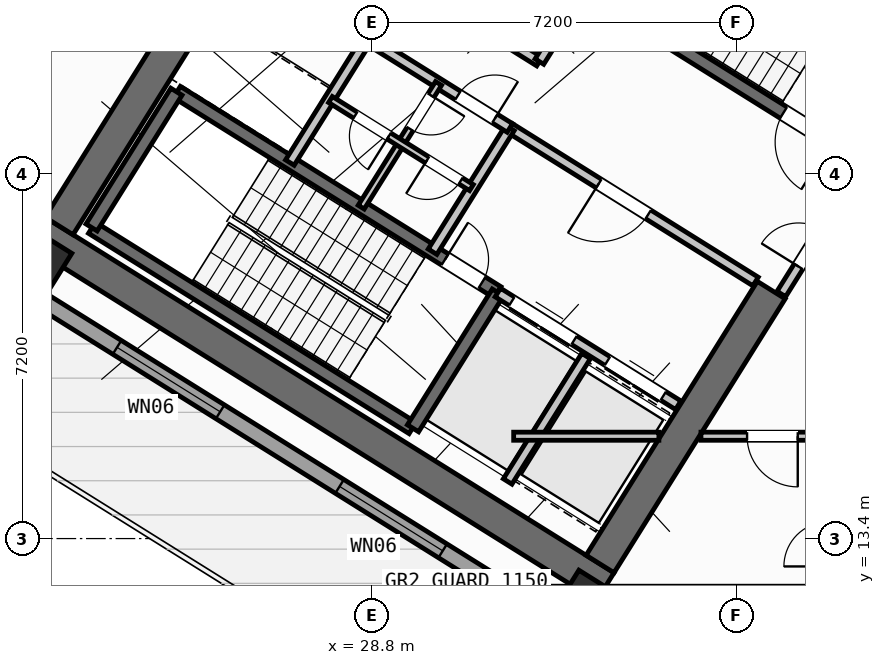
"""IFC4 building model, lengths in metres.
Left out: names, types, materials, properties, quantities, classifications, styles, units other than length and angle.
Written with IfcOpenShell. Run it as: python <this file> out.ifc"""

import sys

from ifc_helpers import new_model, si_unit, direction, frame, frame_2d, origin, origin_2d, place, context, subcontext, project, spatial, rectangle, hollow_rectangle, extrude, source, transform, mapped, element, fill, save


model = new_model("IFC4")
c1 = context("Model", 3, precision=1e-05, world=origin(), true_north=direction((0.0, 1.0)))
c2 = subcontext(c1, "Body", "Model", "MODEL_VIEW")
j1 = project(units=[si_unit("LENGTHUNIT", "METRE"), si_unit("PLANEANGLEUNIT", "RADIAN")], contexts=[c1])
p1 = place(None, origin())
s1 = spatial("IfcSite", under=j1, at=p1, CompositionType="ELEMENT")
p2 = place(p1, origin())
s2 = spatial("IfcBuilding", under=s1, at=p2, CompositionType="ELEMENT")
p3 = place(p2, frame((0.0, 0.0, 71.7)))
s3 = spatial("IfcBuildingStorey", under=s2, at=p3, CompositionType="ELEMENT", Elevation=71.7)
p4 = place(p3, frame((33.409, 12.45, 0.0), z_axis=(0.0, 0.0, 1.0), x_axis=(-0.848051132073, 0.529914405721, 0.0)))
e1 = element("IfcWall", 1, at=p4, inside=s3, PredefinedType="SHEAR", context=c2, shape_type="SweptSolid", body=[
    extrude(rectangle(XDim=13.24, YDim=0.65, at=frame_2d((6.62, 0.0))), origin(), (0.0, 0.0, 1.0), 4.52),
])
p5 = place(p3, frame((36.683, 18.304, 0.0), z_axis=(0.0, 0.0, 1.0), x_axis=(-0.529899109053, -0.848060690178, 0.0)))
e2 = element("IfcWall", 2, at=p5, inside=s3, PredefinedType="SHEAR", context=c2, shape_type="SweptSolid", body=[
    extrude(rectangle(XDim=6.375, YDim=0.65, at=frame_2d((3.188, 0.0))), origin(), (0.0, 0.0, 1.0), 4.52),
])
p6 = place(p3, frame((26.007, 24.976, 0.0), z_axis=(0.0, 0.0, 1.0), x_axis=(-0.529916319127, -0.848049936456, 0.0)))
e3 = element("IfcWall", 3, at=p6, inside=s3, PredefinedType="SHEAR", context=c2, shape_type="SweptSolid", body=[
    extrude(rectangle(XDim=6.375, YDim=0.65, at=frame_2d((3.188, 0.0))), origin(), (0.0, 0.0, 1.0), 4.52),
])
m1 = source(origin(), c2, "Body", "SweptSolid", [
    extrude(hollow_rectangle(XDim=1.0, YDim=1.0, WallThickness=0.04, at=origin_2d()), origin(), (0.0, 0.0, 1.0), 4.8),
])
for number, where, z_axis, x_axis in (
    (4, (33.046, 12.087, 0.0), (0.0, 0.0, 1.0), (-0.848, 0.53, 0.0)),
    (5, (22.191, 18.87, 0.0), (0.0, 0.0, 1.0), (-0.848, 0.53, 0.0)),
):
    element("IfcColumn", number, at=place(p3, frame(where, z_axis=z_axis, x_axis=x_axis)), inside=s3, PredefinedType="COLUMN", context=c2, shape_type="MappedRepresentation", body=[
        mapped(m1, transform((0.0, 0.0, 0.0), scale=1.0)),
    ])
p7 = place(p3, frame((31.76, 12.183, 0.0), z_axis=(0.0, 0.0, 1.0), x_axis=(-0.848047074256, 0.529920899612, 0.0)))
e6 = element("IfcWall", 6, at=p7, inside=s3, PredefinedType="STANDARD", context=c2, shape_type="SweptSolid", body=[
    extrude(rectangle(XDim=30.652, YDim=0.32, at=frame_2d((15.326, 0.0))), origin(), (0.0, 0.0, 1.0), 4.52),
])
p8 = place(p7, frame((20.241, 0.0, 0.0)))
e7 = element("IfcOpeningElement", 7, at=p8, cuts=e6, PredefinedType="OPENING", context=c2, shape_type="SweptSolid", body=[
    extrude(rectangle(XDim=1.2, YDim=2.15, at=frame_2d((0.6, 1.075))), frame((0.0, 0.17, 0.0), z_axis=(0.0, -1.0, 0.0), x_axis=(1.0, 0.0, 0.0)), (0.0, 0.0, 1.0), 0.34),
])
p9 = place(p7, frame((14.781, 0.0, 0.0)))
e8 = element("IfcOpeningElement", 8, at=p9, cuts=e6, PredefinedType="OPENING", context=c2, shape_type="SweptSolid", body=[
    extrude(rectangle(XDim=1.5, YDim=2.25, at=frame_2d((0.75, 1.125))), frame((0.0, 0.17, 0.0), z_axis=(0.0, -1.0, 0.0), x_axis=(1.0, 0.0, 0.0)), (0.0, 0.0, 1.0), 0.34),
])
p10 = place(p7, frame((1.84, 0.0, 0.75)))
e9 = element("IfcOpeningElement", 9, at=p10, cuts=e6, PredefinedType="OPENING", context=c2, shape_type="SweptSolid", body=[
    extrude(rectangle(XDim=2.4, YDim=1.6, at=frame_2d((1.2, 0.8))), frame((0.0, 0.17, 0.0), z_axis=(0.0, -1.0, 0.0), x_axis=(1.0, 0.0, 0.0)), (0.0, 0.0, 1.0), 0.34),
])
p11 = place(p7, frame((7.019, 0.0, 0.75)))
e10 = element("IfcOpeningElement", 10, at=p11, cuts=e6, PredefinedType="OPENING", context=c2, shape_type="SweptSolid", body=[
    extrude(rectangle(XDim=2.4, YDim=1.6, at=frame_2d((1.2, 0.8))), frame((0.0, 0.17, 0.0), z_axis=(0.0, -1.0, 0.0), x_axis=(1.0, 0.0, 0.0)), (0.0, 0.0, 1.0), 0.34),
])
p12 = place(p7, frame((25.841, 0.0, 0.95)))
e11 = element("IfcOpeningElement", 11, at=p12, cuts=e6, PredefinedType="OPENING", context=c2, shape_type="SweptSolid", body=[
    extrude(rectangle(XDim=1.2, YDim=1.4, at=frame_2d((0.6, 0.7))), frame((0.0, 0.17, 0.0), z_axis=(0.0, -1.0, 0.0), x_axis=(1.0, 0.0, 0.0)), (0.0, 0.0, 1.0), 0.34),
])
p13 = place(p3, frame((29.605, 15.581, 0.0), z_axis=(0.0, 0.0, 1.0), x_axis=(-0.848036911448, 0.529937163087, 0.0)))
e12 = element("IfcWall", 12, at=p13, inside=s3, PredefinedType="SHEAR", context=c2, shape_type="SweptSolid", body=[
    extrude(rectangle(XDim=7.46, YDim=0.26, at=frame_2d((3.73, 0.0))), origin(), (0.0, 0.0, 1.0), 4.52),
])
p14 = place(p3, frame((31.28, 18.261, 0.0), z_axis=(0.0, 0.0, 1.0), x_axis=(-0.848051618787, 0.529913626805, 0.0)))
e13 = element("IfcWall", 13, at=p14, inside=s3, PredefinedType="SHEAR", context=c2, shape_type="SweptSolid", body=[
    extrude(rectangle(XDim=7.46, YDim=0.26, at=frame_2d((3.73, 0.0))), origin(), (0.0, 0.0, 1.0), 4.52),
])
p15 = place(p14, frame((0.36, 0.0, 0.0)))
e14 = element("IfcOpeningElement", 14, at=p15, cuts=e13, PredefinedType="OPENING", context=c2, shape_type="SweptSolid", body=[
    extrude(rectangle(XDim=0.86, YDim=2.05, at=frame_2d((0.43, 1.025))), frame((0.0, 0.14, 0.0), z_axis=(0.0, -1.0, 0.0), x_axis=(1.0, 0.0, 0.0)), (0.0, 0.0, 1.0), 0.28),
])
p16 = place(p3, frame((31.288, 18.256, 0.0), z_axis=(0.0, 0.0, 1.0), x_axis=(-0.529943379326, -0.848033026897, 0.0)))
e15 = element("IfcWall", 15, at=p16, inside=s3, PredefinedType="SHEAR", context=c2, shape_type="SweptSolid", body=[
    extrude(rectangle(XDim=3.16, YDim=0.26, at=frame_2d((1.58, 0.0))), origin(), (0.0, 0.0, 1.0), 4.52),
])
p17 = place(p3, frame((24.945, 22.22, 0.0), z_axis=(0.0, 0.0, 1.0), x_axis=(-0.529908658664, -0.84805472316, 0.0)))
e16 = element("IfcWall", 16, at=p17, inside=s3, PredefinedType="SHEAR", context=c2, shape_type="SweptSolid", body=[
    extrude(rectangle(XDim=3.16, YDim=0.26, at=frame_2d((1.58, 0.0))), origin(), (0.0, 0.0, 1.0), 4.52),
])
p18 = place(p3, frame((38.046, 21.108, 0.0), z_axis=(0.0, 0.0, 1.0), x_axis=(-0.848054434086, 0.529909121291, 0.0)))
e17 = element("IfcWall", 17, at=p18, inside=s3, PredefinedType="SHEAR", context=c2, shape_type="SweptSolid", body=[
    extrude(rectangle(XDim=7.33, YDim=0.26, at=frame_2d((3.665, 0.0))), origin(), (0.0, 0.0, 1.0), 4.52),
])
p19 = place(p18, frame((0.22, 0.0, 0.0)))
e18 = element("IfcOpeningElement", 18, at=p19, cuts=e17, PredefinedType="OPENING", context=c2, shape_type="SweptSolid", body=[
    extrude(rectangle(XDim=1.1, YDim=2.1, at=frame_2d((0.55, 1.05))), frame((0.0, 0.14, 0.0), z_axis=(0.0, -1.0, 0.0), x_axis=(1.0, 0.0, 0.0)), (0.0, 0.0, 1.0), 0.28),
])
p20 = place(p3, frame((34.848, 16.031, 0.0), z_axis=(0.0, 0.0, 1.0), x_axis=(-0.848044042236, 0.529925751807, 0.0)))
e19 = element("IfcWall", 19, at=p20, inside=s3, PredefinedType="STANDARD", context=c2, shape_type="SweptSolid", body=[
    extrude(rectangle(XDim=4.198, YDim=0.2, at=frame_2d((2.099, 0.0))), origin(), (0.0, 0.0, 1.0), 4.51),
])
p21 = place(p20, frame((0.348, 0.0, 0.0)))
e20 = element("IfcOpeningElement", 20, at=p21, cuts=e19, PredefinedType="OPENING", context=c2, shape_type="SweptSolid", body=[
    extrude(rectangle(XDim=1.3, YDim=2.2, at=frame_2d((0.65, 1.1))), frame((0.0, 0.11, 0.0), z_axis=(0.0, -1.0, 0.0), x_axis=(1.0, 0.0, 0.0)), (0.0, 0.0, 1.0), 0.22),
])
p22 = place(p20, frame((2.423, 0.0, 0.0)))
e21 = element("IfcOpeningElement", 21, at=p22, cuts=e19, PredefinedType="OPENING", context=c2, shape_type="SweptSolid", body=[
    extrude(rectangle(XDim=1.45, YDim=2.25, at=frame_2d((0.725, 1.125))), frame((0.0, 0.11, 0.0), z_axis=(0.0, -1.0, 0.0), x_axis=(1.0, 0.0, 0.0)), (0.0, 0.0, 1.0), 0.22),
])
p23 = place(p3, frame((36.374, 18.474, 0.0), z_axis=(0.0, 0.0, 1.0), x_axis=(-0.848051071577, 0.529914502535, 0.0)))
e22 = element("IfcWall", 22, at=p23, inside=s3, PredefinedType="STANDARD", context=c2, shape_type="SweptSolid", body=[
    extrude(rectangle(XDim=5.718, YDim=0.2, at=frame_2d((2.859, 0.0))), origin(), (0.0, 0.0, 1.0), 4.51),
])
p24 = place(p23, frame((2.498, 0.0, 0.0)))
e23 = element("IfcOpeningElement", 23, at=p24, cuts=e22, PredefinedType="OPENING", context=c2, shape_type="SweptSolid", body=[
    extrude(rectangle(XDim=1.15, YDim=2.1, at=frame_2d((0.575, 1.05))), frame((0.0, 0.11, 0.0), z_axis=(0.0, -1.0, 0.0), x_axis=(1.0, 0.0, 0.0)), (0.0, 0.0, 1.0), 0.22),
])
p25 = place(p3, frame((32.108, 22.814, 0.0), z_axis=(0.0, 0.0, 1.0), x_axis=(-0.848042229521, 0.529928652696, 0.0)))
e24 = element("IfcWall", 24, at=p25, inside=s3, PredefinedType="STANDARD", context=c2, shape_type="SweptSolid", body=[
    extrude(rectangle(XDim=5.62, YDim=0.2, at=frame_2d((2.81, 0.0))), origin(), (0.0, 0.0, 1.0), 4.51),
])
p26 = place(p3, frame((32.982, 24.213, 0.0), z_axis=(0.0, 0.0, 1.0), x_axis=(-0.529839334948, -0.84809803628, 0.0)))
e25 = element("IfcWall", 25, at=p26, inside=s3, PredefinedType="STANDARD", context=c2, shape_type="SweptSolid", body=[
    extrude(rectangle(XDim=1.65, YDim=0.2, at=frame_2d((0.825, 0.0))), origin(), (0.0, 0.0, 1.0), 4.51),
])
p27 = place(p3, frame((33.029, 17.003, 0.0), z_axis=(0.0, 0.0, 1.0), x_axis=(-0.529916267533, -0.848049968695, 0.0)))
e26 = element("IfcWall", 26, at=p27, inside=s3, PredefinedType="STANDARD", context=c2, shape_type="SweptSolid", body=[
    extrude(rectangle(XDim=2.92, YDim=0.2, at=frame_2d((1.46, 0.0))), origin(), (0.0, 0.0, 1.0), 4.51),
])
for number, where, z_axis, x_axis in (
    (27, (31.525, 21.504, 0.0), (0.0, 0.0, 1.0), (-0.53, -0.848, 0.0)),
    (28, (28.71, 23.263, 0.0), (0.0, 0.0, 1.0), (-0.53, -0.848, 0.0)),
):
    element("IfcWall", number, at=place(p3, frame(where, z_axis=z_axis, x_axis=x_axis)), inside=s3, PredefinedType="STANDARD", context=c2, shape_type="SweptSolid", body=[
        extrude(rectangle(XDim=2.88, YDim=0.2, at=frame_2d((1.44, 0.0))), origin(), (0.0, 0.0, 1.0), 4.51),
    ])
p28 = place(p3, frame((31.525, 21.504, 0.0), z_axis=(0.0, 0.0, 1.0), x_axis=(-0.848044998614, 0.529924221305, 0.0)))
e29 = element("IfcWall", 29, at=p28, inside=s3, PredefinedType="STANDARD", context=c2, shape_type="SweptSolid", body=[
    extrude(rectangle(XDim=6.168, YDim=0.2, at=frame_2d((3.084, 0.0))), origin(), (0.0, 0.0, 1.0), 4.51),
])
p29 = place(p28, frame((4.4, 0.0, 0.0)))
e30 = element("IfcOpeningElement", 30, at=p29, cuts=e29, PredefinedType="OPENING", context=c2, shape_type="SweptSolid", body=[
    extrude(rectangle(XDim=0.86, YDim=2.05, at=frame_2d((0.43, 1.025))), frame((0.0, 0.11, 0.0), z_axis=(0.0, -1.0, 0.0), x_axis=(1.0, 0.0, 0.0)), (0.0, 0.0, 1.0), 0.22),
])
p30 = place(p28, frame((0.35, 0.0, 0.0)))
e31 = element("IfcOpeningElement", 31, at=p30, cuts=e29, PredefinedType="OPENING", context=c2, shape_type="SweptSolid", body=[
    extrude(rectangle(XDim=0.86, YDim=2.05, at=frame_2d((0.43, 1.025))), frame((0.0, 0.11, 0.0), z_axis=(0.0, -1.0, 0.0), x_axis=(1.0, 0.0, 0.0)), (0.0, 0.0, 1.0), 0.22),
])
p31 = place(p3, frame((30.117, 22.384, 0.0), z_axis=(0.0, 0.0, 1.0), x_axis=(-0.529951914384, -0.848027693204, 0.0)))
e32 = element("IfcWall", 32, at=p31, inside=s3, PredefinedType="PLUMBINGWALL", context=c2, shape_type="SweptSolid", body=[
    extrude(rectangle(XDim=1.4, YDim=0.14, at=frame_2d((0.7, 0.0))), origin(), (0.0, 0.0, 1.0), 4.51),
])
p32 = place(p31, frame((0.28, 0.0, 0.0)))
e33 = element("IfcOpeningElement", 33, at=p32, cuts=e32, PredefinedType="OPENING", context=c2, shape_type="SweptSolid", body=[
    extrude(rectangle(XDim=0.78, YDim=2.05, at=frame_2d((0.39, 1.025))), frame((0.0, 0.08, 0.0), z_axis=(0.0, -1.0, 0.0), x_axis=(1.0, 0.0, 0.0)), (0.0, 0.0, 1.0), 0.16),
])
p33 = place(p3, frame((29.375, 21.196, 0.0), z_axis=(0.0, 0.0, 1.0), x_axis=(-0.529865479138, -0.848081702443, 0.0)))
e34 = element("IfcWall", 34, at=p33, inside=s3, PredefinedType="PLUMBINGWALL", context=c2, shape_type="SweptSolid", body=[
    extrude(rectangle(XDim=1.48, YDim=0.14, at=frame_2d((0.74, 0.0))), origin(), (0.0, 0.0, 1.0), 4.51),
])
p34 = place(p3, frame((30.766, 20.327, 0.0), z_axis=(0.0, 0.0, 1.0), x_axis=(-0.848052663127, 0.529911955482, 0.0)))
e35 = element("IfcWall", 35, at=p34, inside=s3, PredefinedType="PLUMBINGWALL", context=c2, shape_type="SweptSolid", body=[
    extrude(rectangle(XDim=3.28, YDim=0.14, at=frame_2d((1.64, 0.0))), origin(), (0.0, 0.0, 1.0), 4.51),
])
p35 = place(p34, frame((0.25, 0.0, 0.0)))
e36 = element("IfcOpeningElement", 36, at=p35, cuts=e35, PredefinedType="OPENING", context=c2, shape_type="SweptSolid", body=[
    extrude(rectangle(XDim=0.78, YDim=2.05, at=frame_2d((0.39, 1.025))), frame((0.0, 0.08, 0.0), z_axis=(0.0, -1.0, 0.0), x_axis=(1.0, 0.0, 0.0)), (0.0, 0.0, 1.0), 0.16),
])
p36 = place(p34, frame((1.92, 0.0, 0.0)))
e37 = element("IfcOpeningElement", 37, at=p36, cuts=e35, PredefinedType="OPENING", context=c2, shape_type="SweptSolid", body=[
    extrude(rectangle(XDim=0.78, YDim=2.05, at=frame_2d((0.39, 1.025))), frame((0.0, 0.08, 0.0), z_axis=(0.0, -1.0, 0.0), x_axis=(1.0, 0.0, 0.0)), (0.0, 0.0, 1.0), 0.16),
])
p37 = place(p3, frame((25.198, 28.606, 0.0), z_axis=(0.0, 0.0, 1.0), x_axis=(-0.529926497642, -0.848043576178, 0.0)))
e38 = element("IfcWall", 38, at=p37, inside=s3, PredefinedType="PARTITIONING", context=c2, shape_type="SweptSolid", body=[
    extrude(rectangle(XDim=10.3, YDim=0.16, at=frame_2d((5.15, 0.0))), origin(), (0.0, 0.0, 1.0), 4.51),
])
p38 = place(p3, frame((38.451, 20.737, 0.0), z_axis=(0.0, 0.0, 1.0), x_axis=(-0.529924799939, -0.848044637038, 0.0)))
e39 = element("IfcWall", 39, at=p38, inside=s3, PredefinedType="STANDARD", context=c2, shape_type="SweptSolid", body=[
    extrude(rectangle(XDim=2.96, YDim=0.2, at=frame_2d((1.48, 0.0))), origin(), (0.0, 0.0, 1.0), 4.51),
])
p39 = place(p38, frame((1.46, 0.0, 0.0)))
e40 = element("IfcOpeningElement", 40, at=p39, cuts=e39, PredefinedType="OPENING", context=c2, shape_type="SweptSolid", body=[
    extrude(rectangle(XDim=0.86, YDim=2.05, at=frame_2d((0.43, 1.025))), frame((0.0, 0.11, 0.0), z_axis=(0.0, -1.0, 0.0), x_axis=(1.0, 0.0, 0.0)), (0.0, 0.0, 1.0), 0.22),
])
p40 = place(p3, frame((31.6, 15.42, 0.0), z_axis=(0.0, 0.0, 1.0), x_axis=(1.0, 0.0, 0.0)))
e41 = element("IfcWall", 41, at=p40, inside=s3, PredefinedType="PARTITIONING", context=c2, shape_type="SweptSolid", body=[
    extrude(rectangle(XDim=2.866, YDim=0.16, at=frame_2d((1.433, 0.0))), origin(), (0.0, 0.0, 1.0), 4.51),
])
p41 = place(p3, frame((35.296, 15.42, 0.0), z_axis=(0.0, 0.0, 1.0), x_axis=(1.0, 0.0, 0.0)))
e42 = element("IfcWall", 42, at=p41, inside=s3, PredefinedType="PARTITIONING", context=c2, shape_type="SweptSolid", body=[
    extrude(rectangle(XDim=15.311, YDim=0.16, at=frame_2d((7.655, 0.0))), origin(), (0.0, 0.0, 1.0), 4.51),
])
p42 = place(p41, frame((0.91, 0.0, 0.0)))
e43 = element("IfcOpeningElement", 43, at=p42, cuts=e42, PredefinedType="OPENING", context=c2, shape_type="SweptSolid", body=[
    extrude(rectangle(XDim=1.0, YDim=2.1, at=frame_2d((0.5, 1.05))), frame((0.0, 0.09, 0.0), z_axis=(0.0, -1.0, 0.0), x_axis=(1.0, 0.0, 0.0)), (0.0, 0.0, 1.0), 0.18),
])
p43 = place(p41, frame((8.74, 0.0, 0.0)))
e44 = element("IfcOpeningElement", 44, at=p43, cuts=e42, PredefinedType="OPENING", context=c2, shape_type="SweptSolid", body=[
    extrude(rectangle(XDim=1.0, YDim=2.1, at=frame_2d((0.5, 1.05))), frame((0.0, 0.09, 0.0), z_axis=(0.0, -1.0, 0.0), x_axis=(1.0, 0.0, 0.0)), (0.0, 0.0, 1.0), 0.18),
])
m2 = source(origin(), c2, "Body", "SweptSolid", [
    extrude(rectangle(XDim=2.4, YDim=1.6, at=frame_2d((1.2, 0.8))), frame((0.0, 0.03, 0.0), z_axis=(0.0, -1.0, 0.0), x_axis=(1.0, 0.0, 0.0)), (0.0, 0.0, 1.0), 0.06),
])
p44 = place(p10, origin())
e45 = element("IfcWindow", 45, at=p44, inside=s3, PartitioningType="SINGLE_PANEL", PredefinedType="WINDOW", context=c2, shape_type="MappedRepresentation", body=[
    mapped(m2, transform((0.0, 0.0, 0.0), scale=1.0)),
])
fill(e9, e45)
p45 = place(p11, origin())
e46 = element("IfcWindow", 46, at=p45, inside=s3, PartitioningType="SINGLE_PANEL", PredefinedType="WINDOW", context=c2, shape_type="MappedRepresentation", body=[
    mapped(m2, transform((0.0, 0.0, 0.0), scale=1.0)),
])
fill(e10, e46)
m3 = source(origin(), c2, "Body", "SweptSolid", [
    extrude(rectangle(XDim=0.86, YDim=2.05, at=frame_2d((0.43, 1.025))), frame((0.0, 0.025, 0.0), z_axis=(0.0, -1.0, 0.0), x_axis=(1.0, 0.0, 0.0)), (0.0, 0.0, 1.0), 0.05),
])
p46 = place(p15, frame((0.86, 0.0, 0.0), z_axis=(0.0, 0.0, 1.0), x_axis=(-1.0, 0.0, 0.0)))
e47 = element("IfcDoor", 47, at=p46, inside=s3, OperationType="SINGLE_SWING_LEFT", PredefinedType="DOOR", context=c2, shape_type="MappedRepresentation", body=[
    mapped(m3, transform((0.0, 0.0, 0.0), scale=1.0)),
])
fill(e14, e47)
m4 = source(origin(), c2, "Body", "SweptSolid", [
    extrude(rectangle(XDim=1.1, YDim=2.1, at=frame_2d((0.55, 1.05))), frame((0.0, 0.025, 0.0), z_axis=(0.0, -1.0, 0.0), x_axis=(1.0, 0.0, 0.0)), (0.0, 0.0, 1.0), 0.05),
])
p47 = place(p19, origin())
e48 = element("IfcDoor", 48, at=p47, inside=s3, OperationType="SINGLE_SWING_LEFT", PredefinedType="DOOR", context=c2, shape_type="MappedRepresentation", body=[
    mapped(m4, transform((0.0, 0.0, 0.0), scale=1.0)),
])
fill(e18, e48)
m5 = source(origin(), c2, "Body", "SweptSolid", [
    extrude(rectangle(XDim=1.15, YDim=2.1, at=frame_2d((0.575, 1.05))), frame((0.0, 0.025, 0.0), z_axis=(0.0, -1.0, 0.0), x_axis=(1.0, 0.0, 0.0)), (0.0, 0.0, 1.0), 0.05),
])
p48 = place(p24, origin())
e49 = element("IfcDoor", 49, at=p48, inside=s3, OperationType="SINGLE_SWING_RIGHT", PredefinedType="DOOR", context=c2, shape_type="MappedRepresentation", body=[
    mapped(m5, transform((0.0, 0.0, 0.0), scale=1.0)),
])
fill(e23, e49)
m6 = source(origin(), c2, "Body", "SweptSolid", [
    extrude(rectangle(XDim=1.3, YDim=2.2, at=frame_2d((0.65, 1.1))), frame((0.0, 0.025, 0.0), z_axis=(0.0, -1.0, 0.0), x_axis=(1.0, 0.0, 0.0)), (0.0, 0.0, 1.0), 0.05),
])
p49 = place(p21, origin())
e50 = element("IfcDoor", 50, at=p49, inside=s3, OperationType="DOUBLE_DOOR_SLIDING", PredefinedType="DOOR", context=c2, shape_type="MappedRepresentation", body=[
    mapped(m6, transform((0.0, 0.0, 0.0), scale=1.0)),
])
fill(e20, e50)
m7 = source(origin(), c2, "Body", "SweptSolid", [
    extrude(rectangle(XDim=1.45, YDim=2.25, at=frame_2d((0.725, 1.125))), frame((0.0, 0.025, 0.0), z_axis=(0.0, -1.0, 0.0), x_axis=(1.0, 0.0, 0.0)), (0.0, 0.0, 1.0), 0.05),
])
p50 = place(p22, origin())
e51 = element("IfcDoor", 51, at=p50, inside=s3, OperationType="DOUBLE_DOOR_SLIDING", PredefinedType="DOOR", context=c2, shape_type="MappedRepresentation", body=[
    mapped(m7, transform((0.0, 0.0, 0.0), scale=1.0)),
])
fill(e21, e51)
p51 = place(p30, frame((0.86, 0.0, 0.0), z_axis=(0.0, 0.0, 1.0), x_axis=(-1.0, 0.0, 0.0)))
e52 = element("IfcDoor", 52, at=p51, inside=s3, OperationType="SINGLE_SWING_RIGHT", PredefinedType="DOOR", context=c2, shape_type="MappedRepresentation", body=[
    mapped(m3, transform((0.0, 0.0, 0.0), scale=1.0)),
])
fill(e31, e52)
m8 = source(origin(), c2, "Body", "SweptSolid", [
    extrude(rectangle(XDim=0.78, YDim=2.05, at=frame_2d((0.39, 1.025))), frame((0.0, 0.025, 0.0), z_axis=(0.0, -1.0, 0.0), x_axis=(1.0, 0.0, 0.0)), (0.0, 0.0, 1.0), 0.05),
])
p52 = place(p32, origin())
e53 = element("IfcDoor", 53, at=p52, inside=s3, OperationType="SINGLE_SWING_LEFT", PredefinedType="DOOR", context=c2, shape_type="MappedRepresentation", body=[
    mapped(m8, transform((0.0, 0.0, 0.0), scale=1.0)),
])
fill(e33, e53)
p53 = place(p35, origin())
e54 = element("IfcDoor", 54, at=p53, inside=s3, OperationType="SINGLE_SWING_RIGHT", PredefinedType="DOOR", context=c2, shape_type="MappedRepresentation", body=[
    mapped(m8, transform((0.0, 0.0, 0.0), scale=1.0)),
])
fill(e36, e54)
p54 = place(p36, origin())
e55 = element("IfcDoor", 55, at=p54, inside=s3, OperationType="SINGLE_SWING_LEFT", PredefinedType="DOOR", context=c2, shape_type="MappedRepresentation", body=[
    mapped(m8, transform((0.0, 0.0, 0.0), scale=1.0)),
])
fill(e37, e55)
p55 = place(p39, frame((0.86, 0.0, 0.0), z_axis=(0.0, 0.0, 1.0), x_axis=(-1.0, 0.0, 0.0)))
e56 = element("IfcDoor", 56, at=p55, inside=s3, OperationType="SINGLE_SWING_LEFT", PredefinedType="DOOR", context=c2, shape_type="MappedRepresentation", body=[
    mapped(m3, transform((0.0, 0.0, 0.0), scale=1.0)),
])
fill(e40, e56)
m9 = source(origin(), c2, "Body", "SweptSolid", [
    extrude(rectangle(XDim=1.0, YDim=2.1, at=frame_2d((0.5, 1.05))), frame((0.0, 0.025, 0.0), z_axis=(0.0, -1.0, 0.0), x_axis=(1.0, 0.0, 0.0)), (0.0, 0.0, 1.0), 0.05),
])
p56 = place(p42, frame((1.0, 0.0, 0.0), z_axis=(0.0, 0.0, 1.0), x_axis=(-1.0, 0.0, 0.0)))
e57 = element("IfcDoor", 57, at=p56, inside=s3, OperationType="SINGLE_SWING_LEFT", PredefinedType="DOOR", context=c2, shape_type="MappedRepresentation", body=[
    mapped(m9, transform((0.0, 0.0, 0.0), scale=1.0)),
])
fill(e43, e57)
save(model, sys.argv[1])
